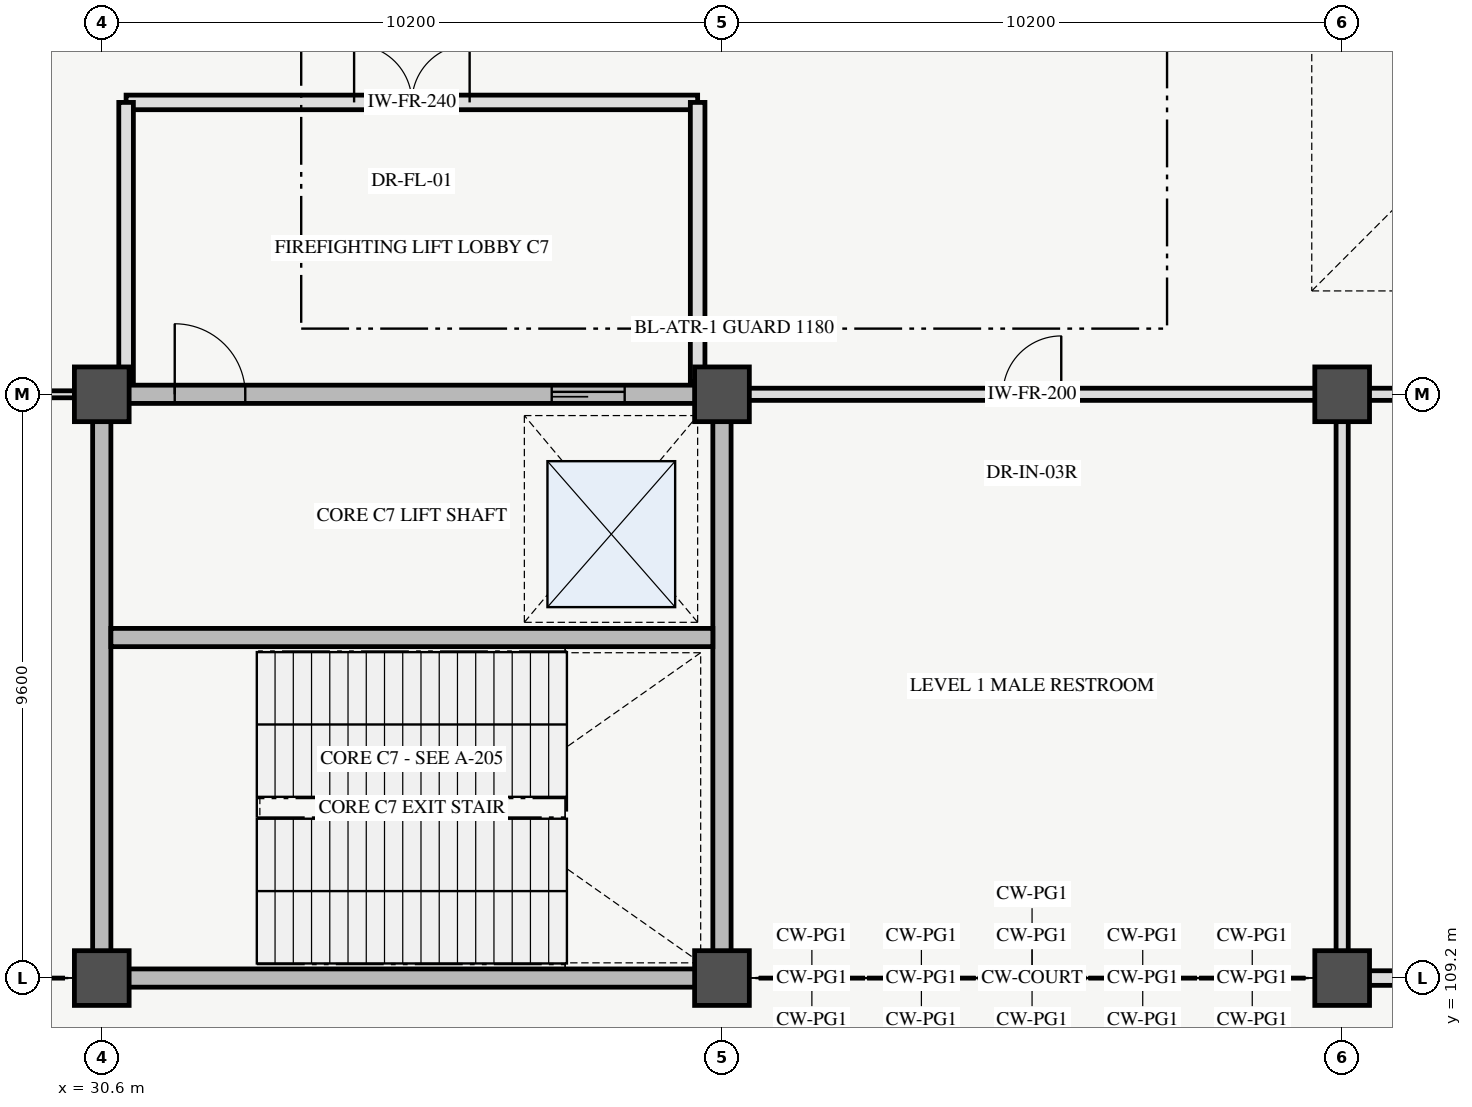
"""IFC4 building model, lengths in metres.
Left out: names, types, materials, properties, quantities, classifications, styles, units other than length and angle.
Written with IfcOpenShell. Run it as: python <this file> out.ifc"""

import sys

from ifc_helpers import new_model, si_unit, direction, frame, frame_2d, origin, origin_2d, place, context, subcontext, project, spatial, rectangle, extrude, element, fill, save


model = new_model("IFC4")
c1 = context("Model", 3, precision=1e-05, world=origin(), true_north=direction((0.0, 1.0)))
c2 = subcontext(c1, "Body", "Model", "MODEL_VIEW")
j1 = project(units=[si_unit("LENGTHUNIT", "METRE"), si_unit("PLANEANGLEUNIT", "RADIAN")], contexts=[c1])
p1 = place(None, origin())
s1 = spatial("IfcSite", under=j1, at=p1, CompositionType="ELEMENT")
p2 = place(p1, origin())
s2 = spatial("IfcBuilding", under=s1, at=p2, CompositionType="ELEMENT")
p3 = place(p2, frame((0.0, 0.0, 5.4)))
s3 = spatial("IfcBuildingStorey", under=s2, at=p3, CompositionType="ELEMENT", Elevation=5.4)
for number, where, z_axis, x_axis in (
    (1, (30.6, 109.2, 0.0), (0.0, 0.0, 1.0), (1.0, 0.0, 0.0)),
    (2, (30.6, 118.8, 0.0), (0.0, 0.0, 1.0), (1.0, 0.0, 0.0)),
    (3, (40.8, 109.2, 0.0), (0.0, 0.0, 1.0), (1.0, 0.0, 0.0)),
    (4, (40.8, 118.8, 0.0), (0.0, 0.0, 1.0), (1.0, 0.0, 0.0)),
    (5, (51.0, 109.2, 0.0), (0.0, 0.0, 1.0), (1.0, 0.0, 0.0)),
    (6, (51.0, 118.8, 0.0), (0.0, 0.0, 1.0), (1.0, 0.0, 0.0)),
):
    element("IfcColumn", number, at=place(p3, frame(where, z_axis=z_axis, x_axis=x_axis)), inside=s3, PredefinedType="COLUMN", context=c2, shape_type="SweptSolid", body=[
        extrude(rectangle(XDim=0.9, YDim=0.9, at=origin_2d()), origin(), (0.0, 0.0, 1.0), 5.4),
    ])
p4 = place(p3, frame((30.6, 109.2, 0.0), z_axis=(0.0, 0.0, 1.0), x_axis=(1.0, 0.0, 0.0)))
e7 = element("IfcWall", 7, at=p4, inside=s3, PredefinedType="SHEAR", context=c2, shape_type="SweptSolid", body=[
    extrude(rectangle(XDim=10.2, YDim=0.3, at=frame_2d((5.1, 0.0))), origin(), (0.0, 0.0, 1.0), 5.4),
])
p5 = place(p3, frame((30.6, 118.8, 0.0), z_axis=(0.0, 0.0, 1.0), x_axis=(1.0, 0.0, 0.0)))
e8 = element("IfcWall", 8, at=p5, inside=s3, PredefinedType="SHEAR", context=c2, shape_type="SweptSolid", body=[
    extrude(rectangle(XDim=10.2, YDim=0.3, at=frame_2d((5.1, 0.0))), origin(), (0.0, 0.0, 1.0), 5.4),
])
p6 = place(p5, frame((1.2, 0.0, 0.0)))
e9 = element("IfcOpeningElement", 9, at=p6, cuts=e8, PredefinedType="OPENING", context=c2, shape_type="SweptSolid", body=[
    extrude(rectangle(XDim=1.16, YDim=2.2, at=frame_2d((0.58, 1.1))), frame((0.0, 0.16, 0.0), z_axis=(0.0, -1.0, 0.0), x_axis=(1.0, 0.0, 0.0)), (0.0, 0.0, 1.0), 0.32),
])
p7 = place(p5, frame((7.4, 0.0, 0.0)))
e10 = element("IfcOpeningElement", 10, at=p7, cuts=e8, PredefinedType="OPENING", context=c2, shape_type="SweptSolid", body=[
    extrude(rectangle(XDim=1.2, YDim=2.25, at=frame_2d((0.6, 1.125))), frame((0.0, 0.16, 0.0), z_axis=(0.0, -1.0, 0.0), x_axis=(1.0, 0.0, 0.0)), (0.0, 0.0, 1.0), 0.32),
])
for number, where, z_axis, x_axis in (
    (11, (30.6, 109.2, 0.0), (0.0, 0.0, 1.0), (0.0, 1.0, 0.0)),
    (12, (40.8, 109.2, 0.0), (0.0, 0.0, 1.0), (0.0, 1.0, 0.0)),
):
    element("IfcWall", number, at=place(p3, frame(where, z_axis=z_axis, x_axis=x_axis)), inside=s3, PredefinedType="SHEAR", context=c2, shape_type="SweptSolid", body=[
        extrude(rectangle(XDim=9.6, YDim=0.3, at=frame_2d((4.8, 0.0))), origin(), (0.0, 0.0, 1.0), 5.4),
    ])
p8 = place(p3, frame((51.24, 109.2, 0.0), z_axis=(0.0, 0.0, 1.0), x_axis=(1.0, 0.0, 0.0)))
e13 = element("IfcWall", 13, at=p8, inside=s3, PredefinedType="STANDARD", context=c2, shape_type="SweptSolid", body=[
    extrude(rectangle(XDim=9.72, YDim=0.24, at=frame_2d((4.86, 0.0))), origin(), (0.0, 0.0, 1.0), 4.32),
])
p9 = place(p8, frame((3.06, 0.0, 0.9)))
e14 = element("IfcOpeningElement", 14, at=p9, cuts=e13, PredefinedType="OPENING", context=c2, shape_type="SweptSolid", body=[
    extrude(rectangle(XDim=3.6, YDim=2.1, at=frame_2d((1.8, 1.05))), frame((0.0, 0.13, 0.0), z_axis=(0.0, -1.0, 0.0), x_axis=(1.0, 0.0, 0.0)), (0.0, 0.0, 1.0), 0.26),
])
p10 = place(p3, frame((30.75, 114.8, 0.0), z_axis=(0.0, 0.0, 1.0), x_axis=(1.0, 0.0, 0.0)))
e15 = element("IfcWall", 15, at=p10, inside=s3, PredefinedType="SHEAR", context=c2, shape_type="SweptSolid", body=[
    extrude(rectangle(XDim=9.9, YDim=0.3, at=frame_2d((4.95, 0.0))), origin(), (0.0, 0.0, 1.0), 5.4),
])
p11 = place(p3, frame((31.0, 123.6, 0.0), z_axis=(0.0, 0.0, 1.0), x_axis=(1.0, 0.0, 0.0)))
e16 = element("IfcWall", 16, at=p11, inside=s3, PredefinedType="PARTITIONING", context=c2, shape_type="SweptSolid", body=[
    extrude(rectangle(XDim=9.4, YDim=0.24, at=frame_2d((4.7, 0.0))), origin(), (0.0, 0.0, 1.0), 4.2),
])
p12 = place(p11, frame((3.75, 0.0, 0.0)))
e17 = element("IfcOpeningElement", 17, at=p12, cuts=e16, PredefinedType="OPENING", context=c2, shape_type="SweptSolid", body=[
    extrude(rectangle(XDim=1.9, YDim=2.25, at=frame_2d((0.95, 1.125))), frame((0.0, 0.13, 0.0), z_axis=(0.0, -1.0, 0.0), x_axis=(1.0, 0.0, 0.0)), (0.0, 0.0, 1.0), 0.26),
])
for number, where, z_axis, x_axis in (
    (18, (40.4, 119.0, 0.0), (0.0, 0.0, 1.0), (0.0, 1.0, 0.0)),
    (19, (31.0, 119.0, 0.0), (0.0, 0.0, 1.0), (0.0, 1.0, 0.0)),
):
    element("IfcWall", number, at=place(p3, frame(where, z_axis=z_axis, x_axis=x_axis)), inside=s3, PredefinedType="PARTITIONING", context=c2, shape_type="SweptSolid", body=[
        extrude(rectangle(XDim=4.6, YDim=0.24, at=frame_2d((2.3, 0.0))), origin(), (0.0, 0.0, 1.0), 4.2),
    ])
p13 = place(p3, frame((41.2, 118.8, 0.0), z_axis=(0.0, 0.0, 1.0), x_axis=(1.0, 0.0, 0.0)))
e20 = element("IfcWall", 20, at=p13, inside=s3, PredefinedType="PARTITIONING", context=c2, shape_type="SweptSolid", body=[
    extrude(rectangle(XDim=9.4, YDim=0.2, at=frame_2d((4.7, 0.0))), origin(), (0.0, 0.0, 1.0), 4.2),
])
p14 = place(p13, frame((4.22, 0.0, 0.0)))
e21 = element("IfcOpeningElement", 21, at=p14, cuts=e20, PredefinedType="OPENING", context=c2, shape_type="SweptSolid", body=[
    extrude(rectangle(XDim=0.96, YDim=2.1, at=frame_2d((0.48, 1.05))), frame((0.0, 0.11, 0.0), z_axis=(0.0, -1.0, 0.0), x_axis=(1.0, 0.0, 0.0)), (0.0, 0.0, 1.0), 0.22),
])
p15 = place(p3, frame((51.4, 118.8, 0.0), z_axis=(0.0, 0.0, 1.0), x_axis=(1.0, 0.0, 0.0)))
e22 = element("IfcWall", 22, at=p15, inside=s3, PredefinedType="PARTITIONING", context=c2, shape_type="SweptSolid", body=[
    extrude(rectangle(XDim=6.2, YDim=0.2, at=frame_2d((3.1, 0.0))), origin(), (0.0, 0.0, 1.0), 4.2),
])
p16 = place(p15, frame((2.52, 0.0, 0.0)))
e23 = element("IfcOpeningElement", 23, at=p16, cuts=e22, PredefinedType="OPENING", context=c2, shape_type="SweptSolid", body=[
    extrude(rectangle(XDim=1.16, YDim=2.2, at=frame_2d((0.58, 1.1))), frame((0.0, 0.11, 0.0), z_axis=(0.0, -1.0, 0.0), x_axis=(1.0, 0.0, 0.0)), (0.0, 0.0, 1.0), 0.22),
])
p17 = place(p3, frame((20.8, 118.8, 0.0), z_axis=(0.0, 0.0, 1.0), x_axis=(1.0, 0.0, 0.0)))
e24 = element("IfcWall", 24, at=p17, inside=s3, PredefinedType="PARTITIONING", context=c2, shape_type="SweptSolid", body=[
    extrude(rectangle(XDim=9.4, YDim=0.115, at=frame_2d((4.7, 0.0))), origin(), (0.0, 0.0, 1.0), 4.2),
])
p18 = place(p17, frame((4.26, 0.0, 0.0)))
e25 = element("IfcOpeningElement", 25, at=p18, cuts=e24, PredefinedType="OPENING", context=c2, shape_type="SweptSolid", body=[
    extrude(rectangle(XDim=0.88, YDim=2.08, at=frame_2d((0.44, 1.04))), frame((0.0, 0.067, 0.0), z_axis=(0.0, -1.0, 0.0), x_axis=(1.0, 0.0, 0.0)), (0.0, 0.0, 1.0), 0.135),
])
p19 = place(p3, frame((51.0, 109.58, 0.0), z_axis=(0.0, 0.0, 1.0), x_axis=(0.0, 1.0, 0.0)))
e26 = element("IfcWall", 26, at=p19, inside=s3, PredefinedType="PARTITIONING", context=c2, shape_type="SweptSolid", body=[
    extrude(rectangle(XDim=8.84, YDim=0.2, at=frame_2d((4.42, 0.0))), origin(), (0.0, 0.0, 1.0), 4.2),
])
p20 = place(p6, origin())
e27 = element("IfcDoor", 27, at=p20, inside=s3, OperationType="SINGLE_SWING_LEFT", PredefinedType="DOOR", context=c2, shape_type="SweptSolid", body=[
    extrude(rectangle(XDim=1.16, YDim=2.2, at=frame_2d((0.58, 1.1))), frame((0.0, 0.025, 0.0), z_axis=(0.0, -1.0, 0.0), x_axis=(1.0, 0.0, 0.0)), (0.0, 0.0, 1.0), 0.05),
])
fill(e9, e27)
p21 = place(p7, origin())
e28 = element("IfcDoor", 28, at=p21, inside=s3, OperationType="SLIDING_TO_LEFT", PredefinedType="DOOR", context=c2, shape_type="SweptSolid", body=[
    extrude(rectangle(XDim=1.2, YDim=2.25, at=frame_2d((0.6, 1.125))), frame((0.0, 0.025, 0.0), z_axis=(0.0, -1.0, 0.0), x_axis=(1.0, 0.0, 0.0)), (0.0, 0.0, 1.0), 0.05),
])
fill(e10, e28)
p22 = place(p12, origin())
e29 = element("IfcDoor", 29, at=p22, inside=s3, OperationType="DOUBLE_DOOR_SINGLE_SWING", PredefinedType="DOOR", context=c2, shape_type="SweptSolid", body=[
    extrude(rectangle(XDim=1.9, YDim=2.25, at=frame_2d((0.95, 1.125))), frame((0.0, 0.025, 0.0), z_axis=(0.0, -1.0, 0.0), x_axis=(1.0, 0.0, 0.0)), (0.0, 0.0, 1.0), 0.05),
])
fill(e17, e29)
p23 = place(p14, origin())
e30 = element("IfcDoor", 30, at=p23, inside=s3, OperationType="SINGLE_SWING_RIGHT", PredefinedType="DOOR", context=c2, shape_type="SweptSolid", body=[
    extrude(rectangle(XDim=0.96, YDim=2.1, at=frame_2d((0.48, 1.05))), frame((0.0, 0.025, 0.0), z_axis=(0.0, -1.0, 0.0), x_axis=(1.0, 0.0, 0.0)), (0.0, 0.0, 1.0), 0.05),
])
fill(e21, e30)
save(model, sys.argv[1])
